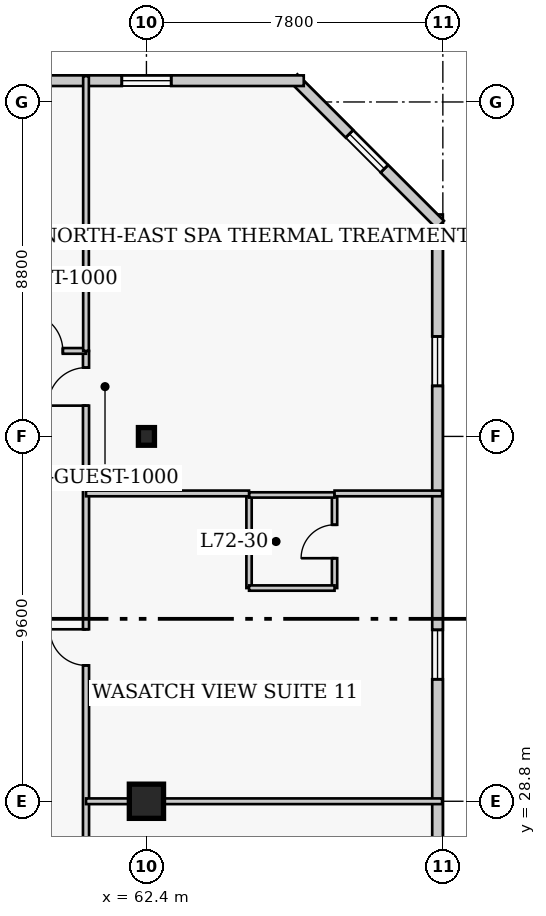
"""IFC4 building model, lengths in metres.
Left out: names, types, materials, properties, quantities, classifications, styles, units other than length and angle.
Written with IfcOpenShell. Run it as: python <this file> out.ifc"""

import sys

from ifc_helpers import new_model, si_unit, direction, frame, frame_2d, origin, origin_2d, place, context, subcontext, project, spatial, rectangle, i_section, extrude, element, fill, save


model = new_model("IFC4")
c1 = context("Model", 3, precision=1e-05, world=origin(), true_north=direction((0.0, 1.0)))
c2 = subcontext(c1, "Body", "Model", "MODEL_VIEW")
j1 = project(units=[si_unit("LENGTHUNIT", "METRE"), si_unit("PLANEANGLEUNIT", "RADIAN")], contexts=[c1])
p1 = place(None, origin())
s1 = spatial("IfcSite", under=j1, at=p1, CompositionType="ELEMENT")
p2 = place(p1, origin())
s2 = spatial("IfcBuilding", under=s1, at=p2, CompositionType="ELEMENT")
p3 = place(p2, frame((0.0, 0.0, 289.4)))
s3 = spatial("IfcBuildingStorey", under=s2, at=p3, CompositionType="ELEMENT", Elevation=289.4)
p4 = place(p3, frame((62.4, 28.8, 0.0), z_axis=(0.0, 0.0, 1.0), x_axis=(1.0, 0.0, 0.0)))
e1 = element("IfcColumn", 1, at=p4, inside=s3, PredefinedType="COLUMN", context=c2, shape_type="SweptSolid", body=[
    extrude(rectangle(XDim=0.9, YDim=0.9, at=origin_2d()), origin(), (0.0, 0.0, 1.0), 4.0),
])
p5 = place(p3, frame((62.4, 38.4, 0.0), z_axis=(0.0, 0.0, 1.0), x_axis=(1.0, 0.0, 0.0)))
e2 = element("IfcColumn", 2, at=p5, inside=s3, PredefinedType="COLUMN", context=c2, shape_type="SweptSolid", body=[
    extrude(i_section(OverallWidth=0.422, OverallDepth=0.465, WebThickness=0.045, FlangeThickness=0.073, FilletRadius=0.017, at=origin_2d()), origin(), (0.0, 0.0, 1.0), 4.0),
])
p6 = place(p3, frame((70.06, 13.36, 0.0), z_axis=(0.0, 0.0, 1.0), x_axis=(0.0, 1.0, 0.0)))
e3 = element("IfcWall", 3, at=p6, inside=s3, PredefinedType="SOLIDWALL", context=c2, shape_type="SweptSolid", body=[
    extrude(rectangle(XDim=30.88, YDim=0.28, at=frame_2d((15.44, 0.0))), origin(), (0.0, 0.0, 1.0), 3.76),
])
p7 = place(p6, frame((3.21, 0.0, 0.85)))
e4 = element("IfcOpeningElement", 4, at=p7, cuts=e3, PredefinedType="OPENING", context=c2, shape_type="SweptSolid", body=[
    extrude(rectangle(XDim=1.3, YDim=1.7, at=frame_2d((0.65, 0.85))), frame((0.0, 0.15, 0.0), z_axis=(0.0, -1.0, 0.0), x_axis=(1.0, 0.0, 0.0)), (0.0, 0.0, 1.0), 0.3),
])
p8 = place(p6, frame((10.93, 0.0, 0.85)))
e5 = element("IfcOpeningElement", 5, at=p8, cuts=e3, PredefinedType="OPENING", context=c2, shape_type="SweptSolid", body=[
    extrude(rectangle(XDim=1.3, YDim=1.7, at=frame_2d((0.65, 0.85))), frame((0.0, 0.15, 0.0), z_axis=(0.0, -1.0, 0.0), x_axis=(1.0, 0.0, 0.0)), (0.0, 0.0, 1.0), 0.3),
])
p9 = place(p6, frame((18.65, 0.0, 0.85)))
e6 = element("IfcOpeningElement", 6, at=p9, cuts=e3, PredefinedType="OPENING", context=c2, shape_type="SweptSolid", body=[
    extrude(rectangle(XDim=1.3, YDim=1.7, at=frame_2d((0.65, 0.85))), frame((0.0, 0.15, 0.0), z_axis=(0.0, -1.0, 0.0), x_axis=(1.0, 0.0, 0.0)), (0.0, 0.0, 1.0), 0.3),
])
p10 = place(p6, frame((26.37, 0.0, 0.85)))
e7 = element("IfcOpeningElement", 7, at=p10, cuts=e3, PredefinedType="OPENING", context=c2, shape_type="SweptSolid", body=[
    extrude(rectangle(XDim=1.3, YDim=1.7, at=frame_2d((0.65, 0.85))), frame((0.0, 0.15, 0.0), z_axis=(0.0, -1.0, 0.0), x_axis=(1.0, 0.0, 0.0)), (0.0, 0.0, 1.0), 0.3),
])
p11 = place(p3, frame((70.129, 43.973, 0.0), z_axis=(0.0, 0.0, 1.0), x_axis=(-0.707106781187, 0.707106781187, 0.0)))
e8 = element("IfcWall", 8, at=p11, inside=s3, PredefinedType="SOLIDWALL", context=c2, shape_type="SweptSolid", body=[
    extrude(rectangle(XDim=5.454, YDim=0.28, at=frame_2d((2.727, 0.0))), origin(), (0.0, 0.0, 1.0), 3.76),
])
p12 = place(p11, frame((2.077, 0.0, 0.85)))
e9 = element("IfcOpeningElement", 9, at=p12, cuts=e8, PredefinedType="OPENING", context=c2, shape_type="SweptSolid", body=[
    extrude(rectangle(XDim=1.3, YDim=1.7, at=frame_2d((0.65, 0.85))), frame((0.0, 0.15, 0.0), z_axis=(0.0, -1.0, 0.0), x_axis=(1.0, 0.0, 0.0)), (0.0, 0.0, 1.0), 0.3),
])
p13 = place(p3, frame((66.54, 47.76, 0.0), z_axis=(0.0, 0.0, 1.0), x_axis=(-1.0, 0.0, 0.0)))
e10 = element("IfcWall", 10, at=p13, inside=s3, PredefinedType="SOLIDWALL", context=c2, shape_type="SweptSolid", body=[
    extrude(rectangle(XDim=24.83, YDim=0.28, at=frame_2d((12.415, 0.0))), origin(), (0.0, 0.0, 1.0), 3.76),
])
p14 = place(p13, frame((3.488, 0.0, 0.85)))
e11 = element("IfcOpeningElement", 11, at=p14, cuts=e10, PredefinedType="OPENING", context=c2, shape_type="SweptSolid", body=[
    extrude(rectangle(XDim=1.3, YDim=1.7, at=frame_2d((0.65, 0.85))), frame((0.0, 0.15, 0.0), z_axis=(0.0, -1.0, 0.0), x_axis=(1.0, 0.0, 0.0)), (0.0, 0.0, 1.0), 0.3),
])
p15 = place(p13, frame((12.915, 0.0, 0.85)))
e12 = element("IfcOpeningElement", 12, at=p15, cuts=e10, PredefinedType="OPENING", context=c2, shape_type="SweptSolid", body=[
    extrude(rectangle(XDim=1.3, YDim=1.7, at=frame_2d((0.65, 0.85))), frame((0.0, 0.15, 0.0), z_axis=(0.0, -1.0, 0.0), x_axis=(1.0, 0.0, 0.0)), (0.0, 0.0, 1.0), 0.3),
])
p16 = place(p13, frame((20.692, 0.0, 0.85)))
e13 = element("IfcOpeningElement", 13, at=p16, cuts=e10, PredefinedType="OPENING", context=c2, shape_type="SweptSolid", body=[
    extrude(rectangle(XDim=1.3, YDim=1.7, at=frame_2d((0.65, 0.85))), frame((0.0, 0.15, 0.0), z_axis=(0.0, -1.0, 0.0), x_axis=(1.0, 0.0, 0.0)), (0.0, 0.0, 1.0), 0.3),
])
p17 = place(p3, frame((60.81, 22.5, 0.0), z_axis=(0.0, 0.0, 1.0), x_axis=(0.0, 1.0, 0.0)))
e14 = element("IfcWall", 14, at=p17, inside=s3, PredefinedType="PARTITIONING", context=c2, shape_type="SweptSolid", body=[
    extrude(rectangle(XDim=18.15, YDim=0.16, at=frame_2d((9.075, 0.0))), origin(), (0.0, 0.0, 1.0), 3.76),
])
p18 = place(p17, frame((2.675, 0.0, 0.0)))
e15 = element("IfcOpeningElement", 15, at=p18, cuts=e14, PredefinedType="OPENING", context=c2, shape_type="SweptSolid", body=[
    extrude(rectangle(XDim=0.95, YDim=2.1, at=frame_2d((0.475, 1.05))), frame((0.0, 0.09, 0.0), z_axis=(0.0, -1.0, 0.0), x_axis=(1.0, 0.0, 0.0)), (0.0, 0.0, 1.0), 0.18),
])
p19 = place(p17, frame((9.875, 0.0, 0.0)))
e16 = element("IfcOpeningElement", 16, at=p19, cuts=e14, PredefinedType="OPENING", context=c2, shape_type="SweptSolid", body=[
    extrude(rectangle(XDim=0.95, YDim=2.1, at=frame_2d((0.475, 1.05))), frame((0.0, 0.09, 0.0), z_axis=(0.0, -1.0, 0.0), x_axis=(1.0, 0.0, 0.0)), (0.0, 0.0, 1.0), 0.18),
])
p20 = place(p17, frame((16.71, 0.0, 0.0)))
e17 = element("IfcOpeningElement", 17, at=p20, cuts=e14, PredefinedType="OPENING", context=c2, shape_type="SweptSolid", body=[
    extrude(rectangle(XDim=1.0, YDim=2.15, at=frame_2d((0.5, 1.075))), frame((0.0, 0.09, 0.0), z_axis=(0.0, -1.0, 0.0), x_axis=(1.0, 0.0, 0.0)), (0.0, 0.0, 1.0), 0.18),
])
p21 = place(p3, frame((56.8, 40.65, 0.0), z_axis=(0.0, 0.0, 1.0), x_axis=(1.0, 0.0, 0.0)))
e18 = element("IfcWall", 18, at=p21, inside=s3, PredefinedType="PARTITIONING", context=c2, shape_type="SweptSolid", body=[
    extrude(rectangle(XDim=4.01, YDim=0.15, at=frame_2d((2.005, 0.0))), origin(), (0.0, 0.0, 1.0), 3.76),
])
p22 = place(p21, frame((2.4, 0.0, 0.0)))
e19 = element("IfcOpeningElement", 19, at=p22, cuts=e18, PredefinedType="OPENING", context=c2, shape_type="SweptSolid", body=[
    extrude(rectangle(XDim=1.0, YDim=2.15, at=frame_2d((0.5, 1.075))), frame((0.0, 0.085, 0.0), z_axis=(0.0, -1.0, 0.0), x_axis=(1.0, 0.0, 0.0)), (0.0, 0.0, 1.0), 0.17),
])
p23 = place(p3, frame((60.81, 40.65, 0.0), z_axis=(0.0, 0.0, 1.0), x_axis=(0.0, 1.0, 0.0)))
e20 = element("IfcWall", 20, at=p23, inside=s3, PredefinedType="PARTITIONING", context=c2, shape_type="SweptSolid", body=[
    extrude(rectangle(XDim=7.23, YDim=0.15, at=frame_2d((3.615, 0.0))), origin(), (0.0, 0.0, 1.0), 3.76),
])
p24 = place(p3, frame((60.81, 28.8, 0.0), z_axis=(0.0, 0.0, 1.0), x_axis=(1.0, 0.0, 0.0)))
e21 = element("IfcWall", 21, at=p24, inside=s3, PredefinedType="PARTITIONING", context=c2, shape_type="SweptSolid", body=[
    extrude(rectangle(XDim=9.37, YDim=0.15, at=frame_2d((4.685, 0.0))), origin(), (0.0, 0.0, 1.0), 3.064),
])
p25 = place(p3, frame((65.1, 34.41, 0.0), z_axis=(0.0, 0.0, 1.0), x_axis=(0.0, 1.0, 0.0)))
e22 = element("IfcWall", 22, at=p25, inside=s3, PredefinedType="PLUMBINGWALL", context=c2, shape_type="SweptSolid", body=[
    extrude(rectangle(XDim=2.45, YDim=0.14, at=frame_2d((1.225, 0.0))), origin(), (0.0, 0.0, 1.0), 3.76),
])
p26 = place(p3, frame((67.35, 34.41, 0.0), z_axis=(0.0, 0.0, 1.0), x_axis=(0.0, 1.0, 0.0)))
e23 = element("IfcWall", 23, at=p26, inside=s3, PredefinedType="PLUMBINGWALL", context=c2, shape_type="SweptSolid", body=[
    extrude(rectangle(XDim=2.45, YDim=0.14, at=frame_2d((1.225, 0.0))), origin(), (0.0, 0.0, 1.0), 3.76),
])
p27 = place(p26, frame((0.785, 0.0, 0.0)))
e24 = element("IfcOpeningElement", 24, at=p27, cuts=e23, PredefinedType="OPENING", context=c2, shape_type="SweptSolid", body=[
    extrude(rectangle(XDim=0.88, YDim=2.05, at=frame_2d((0.44, 1.025))), frame((0.0, 0.08, 0.0), z_axis=(0.0, -1.0, 0.0), x_axis=(1.0, 0.0, 0.0)), (0.0, 0.0, 1.0), 0.16),
])
for number, where, z_axis, x_axis in (
    (25, (65.1, 34.41, 0.0), (0.0, 0.0, 1.0), (1.0, 0.0, 0.0)),
    (26, (65.1, 36.86, 0.0), (0.0, 0.0, 1.0), (1.0, 0.0, 0.0)),
):
    element("IfcWall", number, at=place(p3, frame(where, z_axis=z_axis, x_axis=x_axis)), inside=s3, PredefinedType="PLUMBINGWALL", context=c2, shape_type="SweptSolid", body=[
        extrude(rectangle(XDim=2.25, YDim=0.14, at=frame_2d((1.125, 0.0))), origin(), (0.0, 0.0, 1.0), 3.76),
    ])
p28 = place(p3, frame((60.81, 36.9, 0.0), z_axis=(0.0, 0.0, 1.0), x_axis=(1.0, 0.0, 0.0)))
e27 = element("IfcWall", 27, at=p28, inside=s3, PredefinedType="PARTITIONING", context=c2, shape_type="SweptSolid", body=[
    extrude(rectangle(XDim=4.29, YDim=0.15, at=frame_2d((2.145, 0.0))), origin(), (0.0, 0.0, 1.0), 3.76),
])
p29 = place(p3, frame((67.35, 36.9, 0.0), z_axis=(0.0, 0.0, 1.0), x_axis=(1.0, 0.0, 0.0)))
e28 = element("IfcWall", 28, at=p29, inside=s3, PredefinedType="PARTITIONING", context=c2, shape_type="SweptSolid", body=[
    extrude(rectangle(XDim=2.83, YDim=0.15, at=frame_2d((1.415, 0.0))), origin(), (0.0, 0.0, 1.0), 3.76),
])
p30 = place(p9, origin())
e29 = element("IfcWindow", 29, at=p30, inside=s3, PartitioningType="SINGLE_PANEL", PredefinedType="WINDOW", context=c2, shape_type="SweptSolid", body=[
    extrude(rectangle(XDim=1.3, YDim=1.7, at=frame_2d((0.65, 0.85))), frame((0.0, 0.03, 0.0), z_axis=(0.0, -1.0, 0.0), x_axis=(1.0, 0.0, 0.0)), (0.0, 0.0, 1.0), 0.06),
])
fill(e6, e29)
p31 = place(p10, origin())
e30 = element("IfcWindow", 30, at=p31, inside=s3, PartitioningType="SINGLE_PANEL", PredefinedType="WINDOW", context=c2, shape_type="SweptSolid", body=[
    extrude(rectangle(XDim=1.3, YDim=1.7, at=frame_2d((0.65, 0.85))), frame((0.0, 0.03, 0.0), z_axis=(0.0, -1.0, 0.0), x_axis=(1.0, 0.0, 0.0)), (0.0, 0.0, 1.0), 0.06),
])
fill(e7, e30)
p32 = place(p12, origin())
e31 = element("IfcWindow", 31, at=p32, inside=s3, PartitioningType="SINGLE_PANEL", PredefinedType="WINDOW", context=c2, shape_type="SweptSolid", body=[
    extrude(rectangle(XDim=1.3, YDim=1.7, at=frame_2d((0.65, 0.85))), frame((0.0, 0.03, 0.0), z_axis=(0.0, -1.0, 0.0), x_axis=(1.0, 0.0, 0.0)), (0.0, 0.0, 1.0), 0.06),
])
fill(e9, e31)
p33 = place(p14, origin())
e32 = element("IfcWindow", 32, at=p33, inside=s3, PartitioningType="SINGLE_PANEL", PredefinedType="WINDOW", context=c2, shape_type="SweptSolid", body=[
    extrude(rectangle(XDim=1.3, YDim=1.7, at=frame_2d((0.65, 0.85))), frame((0.0, 0.03, 0.0), z_axis=(0.0, -1.0, 0.0), x_axis=(1.0, 0.0, 0.0)), (0.0, 0.0, 1.0), 0.06),
])
fill(e11, e32)
p34 = place(p22, origin())
e33 = element("IfcDoor", 33, at=p34, inside=s3, OperationType="SINGLE_SWING_LEFT", PredefinedType="DOOR", context=c2, shape_type="SweptSolid", body=[
    extrude(rectangle(XDim=1.0, YDim=2.15, at=frame_2d((0.5, 1.075))), frame((0.0, 0.025, 0.0), z_axis=(0.0, -1.0, 0.0), x_axis=(1.0, 0.0, 0.0)), (0.0, 0.0, 1.0), 0.05),
])
fill(e19, e33)
p35 = place(p27, origin())
e34 = element("IfcDoor", 34, at=p35, inside=s3, OperationType="SINGLE_SWING_LEFT", PredefinedType="DOOR", context=c2, shape_type="SweptSolid", body=[
    extrude(rectangle(XDim=0.88, YDim=2.05, at=frame_2d((0.44, 1.025))), frame((0.0, 0.025, 0.0), z_axis=(0.0, -1.0, 0.0), x_axis=(1.0, 0.0, 0.0)), (0.0, 0.0, 1.0), 0.05),
])
fill(e24, e34)
p36 = place(p19, origin())
e35 = element("IfcDoor", 35, at=p36, inside=s3, OperationType="SINGLE_SWING_RIGHT", PredefinedType="DOOR", context=c2, shape_type="SweptSolid", body=[
    extrude(rectangle(XDim=0.95, YDim=2.1, at=frame_2d((0.475, 1.05))), frame((0.0, 0.025, 0.0), z_axis=(0.0, -1.0, 0.0), x_axis=(1.0, 0.0, 0.0)), (0.0, 0.0, 1.0), 0.05),
])
fill(e16, e35)
p37 = place(p20, origin())
e36 = element("IfcDoor", 36, at=p37, inside=s3, OperationType="SINGLE_SWING_LEFT", PredefinedType="DOOR", context=c2, shape_type="SweptSolid", body=[
    extrude(rectangle(XDim=1.0, YDim=2.15, at=frame_2d((0.5, 1.075))), frame((0.0, 0.025, 0.0), z_axis=(0.0, -1.0, 0.0), x_axis=(1.0, 0.0, 0.0)), (0.0, 0.0, 1.0), 0.05),
])
fill(e17, e36)
save(model, sys.argv[1])
